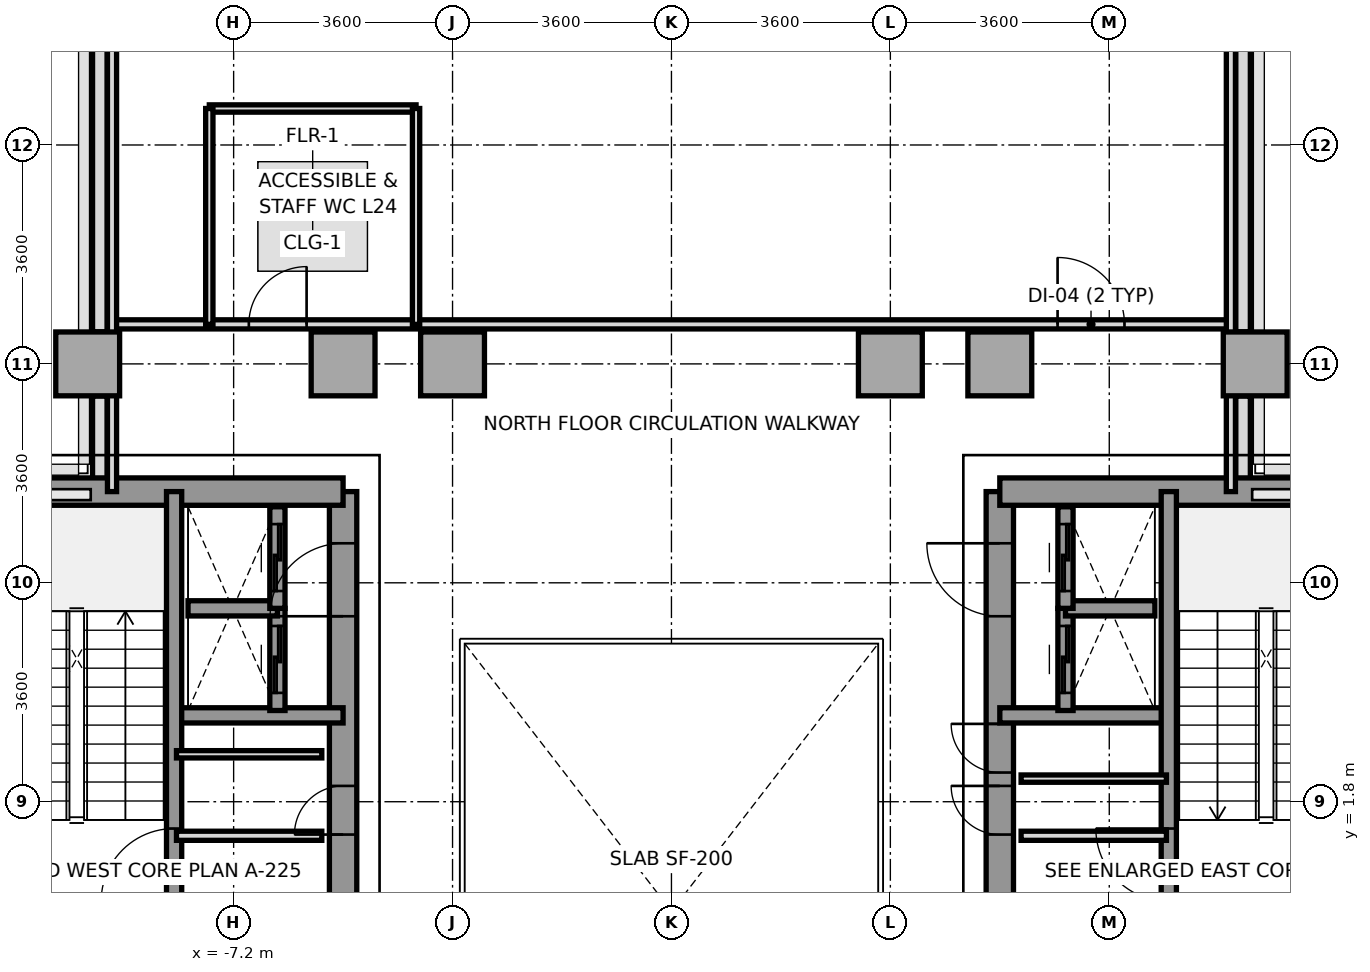
"""IFC4 building model, lengths in metres.
Left out: names, types, materials, properties, quantities, classifications, styles, units other than length and angle.
Written with IfcOpenShell. Run it as: python <this file> out.ifc"""

import sys

from ifc_helpers import new_model, si_unit, direction, frame, frame_2d, origin, origin_2d, place, context, subcontext, project, spatial, rectangle, extrude, source, transform, mapped, element, fill, save


model = new_model("IFC4")
c1 = context("Model", 3, precision=1e-05, world=origin(), true_north=direction((0.0, 1.0)))
c2 = subcontext(c1, "Body", "Model", "MODEL_VIEW")
j1 = project(units=[si_unit("LENGTHUNIT", "METRE"), si_unit("PLANEANGLEUNIT", "RADIAN")], contexts=[c1])
p1 = place(None, origin())
s1 = spatial("IfcSite", under=j1, at=p1, CompositionType="ELEMENT")
p2 = place(p1, origin())
s2 = spatial("IfcBuilding", under=s1, at=p2, CompositionType="ELEMENT")
p3 = place(p2, frame((0.0, 0.0, 93.0)))
s3 = spatial("IfcBuildingStorey", under=s2, at=p3, CompositionType="ELEMENT", Elevation=93.0)
m1 = source(origin(), c2, "Body", "SweptSolid", [
    extrude(rectangle(XDim=1.05, YDim=1.05, at=origin_2d()), origin(), (0.0, 0.0, 1.0), 4.0),
])
for number, where, z_axis, x_axis in (
    (1, (-9.6, 9.0, 0.0), (0.0, 0.0, 1.0), (1.0, 0.0, 0.0)),
    (2, (-5.4, 9.0, 0.0), (0.0, 0.0, 1.0), (1.0, 0.0, 0.0)),
    (3, (-3.6, 9.0, 0.0), (0.0, 0.0, 1.0), (1.0, 0.0, 0.0)),
    (4, (3.6, 9.0, 0.0), (0.0, 0.0, 1.0), (1.0, 0.0, 0.0)),
    (5, (5.4, 9.0, 0.0), (0.0, 0.0, 1.0), (1.0, 0.0, 0.0)),
    (6, (9.6, 9.0, 0.0), (0.0, 0.0, 1.0), (1.0, 0.0, 0.0)),
):
    element("IfcColumn", number, at=place(p3, frame(where, z_axis=z_axis, x_axis=x_axis)), inside=s3, PredefinedType="COLUMN", context=c2, shape_type="MappedRepresentation", body=[
        mapped(m1, transform((0.0, 0.0, 0.0), x_axis=(1.0, 0.0, 0.0), y_axis=(0.0, 1.0, 0.0), z_axis=(0.0, 0.0, 1.0), scale=1.0)),
    ])
p4 = place(p3, frame((-9.4, 6.953, 0.0), z_axis=(0.0, 0.0, 1.0), x_axis=(0.0, 1.0, 0.0)))
e7 = element("IfcWall", 7, at=p4, inside=s3, PredefinedType="PARAPET", context=c2, shape_type="SweptSolid", body=[
    extrude(rectangle(XDim=1.519, YDim=0.24, at=frame_2d((0.76, 0.0))), origin(), (0.0, 0.0, 1.0), 1.15),
])
p5 = place(p3, frame((-9.4, 9.528, 0.0), z_axis=(0.0, 0.0, 1.0), x_axis=(0.0, 1.0, 0.0)))
e8 = element("IfcWall", 8, at=p5, inside=s3, PredefinedType="PARAPET", context=c2, shape_type="SweptSolid", body=[
    extrude(rectangle(XDim=6.075, YDim=0.24, at=frame_2d((3.037, 0.0))), origin(), (0.0, 0.0, 1.0), 1.15),
])
p6 = place(p3, frame((9.4, 15.358, 0.0), z_axis=(0.0, 0.0, 1.0), x_axis=(0.0, -1.0, 0.0)))
e9 = element("IfcWall", 9, at=p6, inside=s3, PredefinedType="PARAPET", context=c2, shape_type="SweptSolid", body=[
    extrude(rectangle(XDim=5.83, YDim=0.24, at=frame_2d((2.915, 0.0))), origin(), (0.0, 0.0, 1.0), 1.15),
])
p7 = place(p3, frame((9.4, 8.472, 0.0), z_axis=(0.0, 0.0, 1.0), x_axis=(0.0, -1.0, 0.0)))
e10 = element("IfcWall", 10, at=p7, inside=s3, PredefinedType="PARAPET", context=c2, shape_type="SweptSolid", body=[
    extrude(rectangle(XDim=1.519, YDim=0.24, at=frame_2d((0.76, 0.0))), origin(), (0.0, 0.0, 1.0), 1.15),
])
p8 = place(p3, frame((-5.4, -5.6, 0.0), z_axis=(0.0, 0.0, 1.0), x_axis=(0.0, 1.0, 0.0)))
e11 = element("IfcWall", 11, at=p8, inside=s3, PredefinedType="SHEAR", context=c2, shape_type="SweptSolid", body=[
    extrude(rectangle(XDim=12.5, YDim=0.45, at=frame_2d((6.25, 0.0))), origin(), (0.0, 0.0, 1.0), 4.0),
])
p9 = place(p8, frame((4.55, 0.0, 0.0)))
e12 = element("IfcOpeningElement", 12, at=p9, cuts=e11, PredefinedType="OPENING", context=c2, shape_type="SweptSolid", body=[
    extrude(rectangle(XDim=1.2, YDim=2.2, at=frame_2d((0.6, 1.1))), frame((0.0, 0.235, 0.0), z_axis=(0.0, -1.0, 0.0), x_axis=(1.0, 0.0, 0.0)), (0.0, 0.0, 1.0), 0.47),
])
p10 = place(p8, frame((10.45, 0.0, 0.0)))
e13 = element("IfcOpeningElement", 13, at=p10, cuts=e11, PredefinedType="OPENING", context=c2, shape_type="SweptSolid", body=[
    extrude(rectangle(XDim=1.2, YDim=2.2, at=frame_2d((0.6, 1.1))), frame((0.0, 0.235, 0.0), z_axis=(0.0, -1.0, 0.0), x_axis=(1.0, 0.0, 0.0)), (0.0, 0.0, 1.0), 0.47),
])
p11 = place(p8, frame((6.86, 0.0, 0.0)))
e14 = element("IfcOpeningElement", 14, at=p11, cuts=e11, PredefinedType="OPENING", context=c2, shape_type="SweptSolid", body=[
    extrude(rectangle(XDim=0.8, YDim=2.1, at=frame_2d((0.4, 1.05))), frame((0.0, 0.235, 0.0), z_axis=(0.0, -1.0, 0.0), x_axis=(1.0, 0.0, 0.0)), (0.0, 0.0, 1.0), 0.47),
])
p12 = place(p3, frame((-11.381, 6.9, 0.0), z_axis=(0.0, 0.0, 1.0), x_axis=(1.0, 0.0, 0.0)))
e15 = element("IfcWall", 15, at=p12, inside=s3, PredefinedType="SHEAR", context=c2, shape_type="SweptSolid", body=[
    extrude(rectangle(XDim=5.981, YDim=0.45, at=frame_2d((2.991, 0.0))), origin(), (0.0, 0.0, 1.0), 4.0),
])
p13 = place(p3, frame((-8.18, 3.22, 0.0), z_axis=(0.0, 0.0, 1.0), x_axis=(1.0, 0.0, 0.0)))
e16 = element("IfcWall", 16, at=p13, inside=s3, PredefinedType="SOLIDWALL", context=c2, shape_type="SweptSolid", body=[
    extrude(rectangle(XDim=2.78, YDim=0.25, at=frame_2d((1.39, 0.0))), origin(), (0.0, 0.0, 1.0), 4.0),
])
p14 = place(p3, frame((-8.179, -0.041, 0.0), z_axis=(0.0, 0.0, 1.0), x_axis=(0.0, 1.0, 0.0)))
e17 = element("IfcWall", 17, at=p14, inside=s3, PredefinedType="SOLIDWALL", context=c2, shape_type="SweptSolid", body=[
    extrude(rectangle(XDim=6.941, YDim=0.25, at=frame_2d((3.47, 0.0))), origin(), (0.0, 0.0, 1.0), 4.0),
])
p15 = place(p14, frame((0.2, 0.0, 0.0)))
e18 = element("IfcOpeningElement", 18, at=p15, cuts=e17, PredefinedType="OPENING", context=c2, shape_type="SweptSolid", body=[
    extrude(rectangle(XDim=1.2, YDim=2.2, at=frame_2d((0.6, 1.1))), frame((0.0, 0.135, 0.0), z_axis=(0.0, -1.0, 0.0), x_axis=(1.0, 0.0, 0.0)), (0.0, 0.0, 1.0), 0.27),
])
p16 = place(p3, frame((5.4, -5.6, 0.0), z_axis=(0.0, 0.0, 1.0), x_axis=(0.0, 1.0, 0.0)))
e19 = element("IfcWall", 19, at=p16, inside=s3, PredefinedType="SHEAR", context=c2, shape_type="SweptSolid", body=[
    extrude(rectangle(XDim=12.5, YDim=0.45, at=frame_2d((6.25, 0.0))), origin(), (0.0, 0.0, 1.0), 4.0),
])
p17 = place(p16, frame((4.55, 0.0, 0.0)))
e20 = element("IfcOpeningElement", 20, at=p17, cuts=e19, PredefinedType="OPENING", context=c2, shape_type="SweptSolid", body=[
    extrude(rectangle(XDim=1.2, YDim=2.2, at=frame_2d((0.6, 1.1))), frame((0.0, 0.235, 0.0), z_axis=(0.0, -1.0, 0.0), x_axis=(1.0, 0.0, 0.0)), (0.0, 0.0, 1.0), 0.47),
])
p18 = place(p16, frame((10.45, 0.0, 0.0)))
e21 = element("IfcOpeningElement", 21, at=p18, cuts=e19, PredefinedType="OPENING", context=c2, shape_type="SweptSolid", body=[
    extrude(rectangle(XDim=1.2, YDim=2.2, at=frame_2d((0.6, 1.1))), frame((0.0, 0.235, 0.0), z_axis=(0.0, -1.0, 0.0), x_axis=(1.0, 0.0, 0.0)), (0.0, 0.0, 1.0), 0.47),
])
p19 = place(p16, frame((6.86, 0.0, 0.0)))
e22 = element("IfcOpeningElement", 22, at=p19, cuts=e19, PredefinedType="OPENING", context=c2, shape_type="SweptSolid", body=[
    extrude(rectangle(XDim=0.8, YDim=2.1, at=frame_2d((0.4, 1.05))), frame((0.0, 0.235, 0.0), z_axis=(0.0, -1.0, 0.0), x_axis=(1.0, 0.0, 0.0)), (0.0, 0.0, 1.0), 0.47),
])
p20 = place(p16, frame((7.88, 0.0, 0.0)))
e23 = element("IfcOpeningElement", 23, at=p20, cuts=e19, PredefinedType="OPENING", context=c2, shape_type="SweptSolid", body=[
    extrude(rectangle(XDim=0.8, YDim=2.1, at=frame_2d((0.4, 1.05))), frame((0.0, 0.235, 0.0), z_axis=(0.0, -1.0, 0.0), x_axis=(1.0, 0.0, 0.0)), (0.0, 0.0, 1.0), 0.47),
])
p21 = place(p3, frame((5.4, 6.9, 0.0), z_axis=(0.0, 0.0, 1.0), x_axis=(1.0, 0.0, 0.0)))
e24 = element("IfcWall", 24, at=p21, inside=s3, PredefinedType="SHEAR", context=c2, shape_type="SweptSolid", body=[
    extrude(rectangle(XDim=5.981, YDim=0.45, at=frame_2d((2.991, 0.0))), origin(), (0.0, 0.0, 1.0), 4.0),
])
p22 = place(p3, frame((5.4, 3.22, 0.0), z_axis=(0.0, 0.0, 1.0), x_axis=(1.0, 0.0, 0.0)))
e25 = element("IfcWall", 25, at=p22, inside=s3, PredefinedType="SOLIDWALL", context=c2, shape_type="SweptSolid", body=[
    extrude(rectangle(XDim=2.78, YDim=0.25, at=frame_2d((1.39, 0.0))), origin(), (0.0, 0.0, 1.0), 4.0),
])
p23 = place(p3, frame((8.179, -0.041, 0.0), z_axis=(0.0, 0.0, 1.0), x_axis=(0.0, 1.0, 0.0)))
e26 = element("IfcWall", 26, at=p23, inside=s3, PredefinedType="SOLIDWALL", context=c2, shape_type="SweptSolid", body=[
    extrude(rectangle(XDim=6.941, YDim=0.25, at=frame_2d((3.47, 0.0))), origin(), (0.0, 0.0, 1.0), 4.0),
])
p24 = place(p23, frame((0.2, 0.0, 0.0)))
e27 = element("IfcOpeningElement", 27, at=p24, cuts=e26, PredefinedType="OPENING", context=c2, shape_type="SweptSolid", body=[
    extrude(rectangle(XDim=1.2, YDim=2.2, at=frame_2d((0.6, 1.1))), frame((0.0, 0.135, 0.0), z_axis=(0.0, -1.0, 0.0), x_axis=(1.0, 0.0, 0.0)), (0.0, 0.0, 1.0), 0.27),
])
p25 = place(p3, frame((-6.48, 3.3, 0.0), z_axis=(0.0, 0.0, 1.0), x_axis=(0.0, 1.0, 0.0)))
e28 = element("IfcWall", 28, at=p25, inside=s3, PredefinedType="SOLIDWALL", context=c2, shape_type="SweptSolid", body=[
    extrude(rectangle(XDim=1.68, YDim=0.25, at=frame_2d((0.84, 0.0))), origin(), (0.0, 0.0, 1.0), 4.0),
])
p26 = place(p25, frame((0.29, 0.0, 0.0)))
e29 = element("IfcOpeningElement", 29, at=p26, cuts=e28, PredefinedType="OPENING", context=c2, shape_type="SweptSolid", body=[
    extrude(rectangle(XDim=1.1, YDim=2.2, at=frame_2d((0.55, 1.1))), frame((0.0, 0.135, 0.0), z_axis=(0.0, -1.0, 0.0), x_axis=(1.0, 0.0, 0.0)), (0.0, 0.0, 1.0), 0.27),
])
p27 = place(p3, frame((-7.95, 4.98, 0.0), z_axis=(0.0, 0.0, 1.0), x_axis=(1.0, 0.0, 0.0)))
e30 = element("IfcWall", 30, at=p27, inside=s3, PredefinedType="SOLIDWALL", context=c2, shape_type="SweptSolid", body=[
    extrude(rectangle(XDim=1.47, YDim=0.25, at=frame_2d((0.735, 0.0))), origin(), (0.0, 0.0, 1.0), 4.0),
])
p28 = place(p3, frame((-6.48, 4.98, 0.0), z_axis=(0.0, 0.0, 1.0), x_axis=(0.0, 1.0, 0.0)))
e31 = element("IfcWall", 31, at=p28, inside=s3, PredefinedType="SOLIDWALL", context=c2, shape_type="SweptSolid", body=[
    extrude(rectangle(XDim=1.67, YDim=0.25, at=frame_2d((0.835, 0.0))), origin(), (0.0, 0.0, 1.0), 4.0),
])
p29 = place(p28, frame((0.285, 0.0, 0.0)))
e32 = element("IfcOpeningElement", 32, at=p29, cuts=e31, PredefinedType="OPENING", context=c2, shape_type="SweptSolid", body=[
    extrude(rectangle(XDim=1.1, YDim=2.2, at=frame_2d((0.55, 1.1))), frame((0.0, 0.135, 0.0), z_axis=(0.0, -1.0, 0.0), x_axis=(1.0, 0.0, 0.0)), (0.0, 0.0, 1.0), 0.27),
])
p30 = place(p3, frame((6.48, 3.3, 0.0), z_axis=(0.0, 0.0, 1.0), x_axis=(0.0, 1.0, 0.0)))
e33 = element("IfcWall", 33, at=p30, inside=s3, PredefinedType="SOLIDWALL", context=c2, shape_type="SweptSolid", body=[
    extrude(rectangle(XDim=1.68, YDim=0.25, at=frame_2d((0.84, 0.0))), origin(), (0.0, 0.0, 1.0), 4.0),
])
p31 = place(p30, frame((0.29, 0.0, 0.0)))
e34 = element("IfcOpeningElement", 34, at=p31, cuts=e33, PredefinedType="OPENING", context=c2, shape_type="SweptSolid", body=[
    extrude(rectangle(XDim=1.1, YDim=2.2, at=frame_2d((0.55, 1.1))), frame((0.0, 0.135, 0.0), z_axis=(0.0, -1.0, 0.0), x_axis=(1.0, 0.0, 0.0)), (0.0, 0.0, 1.0), 0.27),
])
p32 = place(p3, frame((6.48, 4.98, 0.0), z_axis=(0.0, 0.0, 1.0), x_axis=(1.0, 0.0, 0.0)))
e35 = element("IfcWall", 35, at=p32, inside=s3, PredefinedType="SOLIDWALL", context=c2, shape_type="SweptSolid", body=[
    extrude(rectangle(XDim=1.47, YDim=0.25, at=frame_2d((0.735, 0.0))), origin(), (0.0, 0.0, 1.0), 4.0),
])
p33 = place(p3, frame((6.48, 4.98, 0.0), z_axis=(0.0, 0.0, 1.0), x_axis=(0.0, 1.0, 0.0)))
e36 = element("IfcWall", 36, at=p33, inside=s3, PredefinedType="SOLIDWALL", context=c2, shape_type="SweptSolid", body=[
    extrude(rectangle(XDim=1.67, YDim=0.25, at=frame_2d((0.835, 0.0))), origin(), (0.0, 0.0, 1.0), 4.0),
])
p34 = place(p33, frame((0.285, 0.0, 0.0)))
e37 = element("IfcOpeningElement", 37, at=p34, cuts=e36, PredefinedType="OPENING", context=c2, shape_type="SweptSolid", body=[
    extrude(rectangle(XDim=1.1, YDim=2.2, at=frame_2d((0.55, 1.1))), frame((0.0, 0.135, 0.0), z_axis=(0.0, -1.0, 0.0), x_axis=(1.0, 0.0, 0.0)), (0.0, 0.0, 1.0), 0.27),
])
for number, where, z_axis, x_axis in (
    (38, (-8.14, 1.24, 0.0), (0.0, 0.0, 1.0), (1.0, 0.0, 0.0)),
    (39, (5.75, 1.24, 0.0), (0.0, 0.0, 1.0), (1.0, 0.0, 0.0)),
):
    element("IfcWall", number, at=place(p3, frame(where, z_axis=z_axis, x_axis=x_axis)), inside=s3, PredefinedType="PARTITIONING", context=c2, shape_type="SweptSolid", body=[
        extrude(rectangle(XDim=2.39, YDim=0.15, at=frame_2d((1.195, 0.0))), origin(), (0.0, 0.0, 1.0), 3.1),
    ])
for number, where, z_axis, x_axis in (
    (40, (-8.14, 2.58, 0.0), (0.0, 0.0, 1.0), (1.0, 0.0, 0.0)),
    (41, (5.75, 2.18, 0.0), (0.0, 0.0, 1.0), (1.0, 0.0, 0.0)),
):
    element("IfcWall", number, at=place(p3, frame(where, z_axis=z_axis, x_axis=x_axis)), inside=s3, PredefinedType="PARTITIONING", context=c2, shape_type="SweptSolid", body=[
        extrude(rectangle(XDim=2.39, YDim=0.12, at=frame_2d((1.195, 0.0))), origin(), (0.0, 0.0, 1.0), 3.1),
    ])
p35 = place(p3, frame((-9.2, 9.65, 0.0), z_axis=(0.0, 0.0, 1.0), x_axis=(1.0, 0.0, 0.0)))
e42 = element("IfcWall", 42, at=p35, inside=s3, PredefinedType="PARTITIONING", context=c2, shape_type="SweptSolid", body=[
    extrude(rectangle(XDim=18.4, YDim=0.15, at=frame_2d((9.2, 0.0))), origin(), (0.0, 0.0, 1.0), 4.0),
])
p36 = place(p35, frame((2.25, 0.0, 0.0)))
e43 = element("IfcOpeningElement", 43, at=p36, cuts=e42, PredefinedType="OPENING", context=c2, shape_type="SweptSolid", body=[
    extrude(rectangle(XDim=0.95, YDim=2.15, at=frame_2d((0.475, 1.075))), frame((0.0, 0.085, 0.0), z_axis=(0.0, -1.0, 0.0), x_axis=(1.0, 0.0, 0.0)), (0.0, 0.0, 1.0), 0.17),
])
p37 = place(p35, frame((15.55, 0.0, 0.0)))
e44 = element("IfcOpeningElement", 44, at=p37, cuts=e42, PredefinedType="OPENING", context=c2, shape_type="SweptSolid", body=[
    extrude(rectangle(XDim=1.1, YDim=2.2, at=frame_2d((0.55, 1.1))), frame((0.0, 0.085, 0.0), z_axis=(0.0, -1.0, 0.0), x_axis=(1.0, 0.0, 0.0)), (0.0, 0.0, 1.0), 0.17),
])
for number, where, z_axis, x_axis in (
    (45, (-9.2, 6.9, 0.0), (0.0, 0.0, 1.0), (0.0, 1.0, 0.0)),
    (46, (9.2, 6.9, 0.0), (0.0, 0.0, 1.0), (0.0, 1.0, 0.0)),
):
    element("IfcWall", number, at=place(p3, frame(where, z_axis=z_axis, x_axis=x_axis)), inside=s3, PredefinedType="PARTITIONING", context=c2, shape_type="SweptSolid", body=[
        extrude(rectangle(XDim=8.78, YDim=0.15, at=frame_2d((4.39, 0.0))), origin(), (0.0, 0.0, 1.0), 3.5),
    ])
p38 = place(p3, frame((-7.6, 13.2, 0.0), z_axis=(0.0, 0.0, 1.0), x_axis=(1.0, 0.0, 0.0)))
e47 = element("IfcWall", 47, at=p38, inside=s3, PredefinedType="PARTITIONING", context=c2, shape_type="SweptSolid", body=[
    extrude(rectangle(XDim=3.4, YDim=0.12, at=frame_2d((1.7, 0.0))), origin(), (0.0, 0.0, 1.0), 4.0),
])
for number, where, z_axis, x_axis in (
    (48, (-7.6, 9.65, 0.0), (0.0, 0.0, 1.0), (0.0, 1.0, 0.0)),
    (49, (-4.2, 9.65, 0.0), (0.0, 0.0, 1.0), (0.0, 1.0, 0.0)),
):
    element("IfcWall", number, at=place(p3, frame(where, z_axis=z_axis, x_axis=x_axis)), inside=s3, PredefinedType="PARTITIONING", context=c2, shape_type="SweptSolid", body=[
        extrude(rectangle(XDim=3.55, YDim=0.12, at=frame_2d((1.775, 0.0))), origin(), (0.0, 0.0, 1.0), 4.0),
    ])
m2 = source(origin(), c2, "Body", "SweptSolid", [
    extrude(rectangle(XDim=1.2, YDim=2.2, at=frame_2d((0.6, 1.1))), frame((0.0, 0.025, 0.0), z_axis=(0.0, -1.0, 0.0), x_axis=(1.0, 0.0, 0.0)), (0.0, 0.0, 1.0), 0.05),
])
p39 = place(p15, origin())
e50 = element("IfcDoor", 50, at=p39, inside=s3, OperationType="SINGLE_SWING_LEFT", PredefinedType="DOOR", context=c2, shape_type="MappedRepresentation", body=[
    mapped(m2, transform((0.0, 0.0, 0.0), x_axis=(1.0, 0.0, 0.0), y_axis=(0.0, 1.0, 0.0), z_axis=(0.0, 0.0, 1.0), scale=1.0)),
])
fill(e18, e50)
p40 = place(p10, origin())
e51 = element("IfcDoor", 51, at=p40, inside=s3, OperationType="SINGLE_SWING_LEFT", PredefinedType="DOOR", context=c2, shape_type="MappedRepresentation", body=[
    mapped(m2, transform((0.0, 0.0, 0.0), x_axis=(1.0, 0.0, 0.0), y_axis=(0.0, 1.0, 0.0), z_axis=(0.0, 0.0, 1.0), scale=1.0)),
])
fill(e13, e51)
p41 = place(p24, origin())
e52 = element("IfcDoor", 52, at=p41, inside=s3, OperationType="SINGLE_SWING_RIGHT", PredefinedType="DOOR", context=c2, shape_type="MappedRepresentation", body=[
    mapped(m2, transform((0.0, 0.0, 0.0), x_axis=(1.0, 0.0, 0.0), y_axis=(0.0, 1.0, 0.0), z_axis=(0.0, 0.0, 1.0), scale=1.0)),
])
fill(e27, e52)
p42 = place(p18, origin())
e53 = element("IfcDoor", 53, at=p42, inside=s3, OperationType="SINGLE_SWING_RIGHT", PredefinedType="DOOR", context=c2, shape_type="MappedRepresentation", body=[
    mapped(m2, transform((0.0, 0.0, 0.0), x_axis=(1.0, 0.0, 0.0), y_axis=(0.0, 1.0, 0.0), z_axis=(0.0, 0.0, 1.0), scale=1.0)),
])
fill(e21, e53)
m3 = source(origin(), c2, "Body", "SweptSolid", [
    extrude(rectangle(XDim=0.8, YDim=2.1, at=frame_2d((0.4, 1.05))), frame((0.0, 0.025, 0.0), z_axis=(0.0, -1.0, 0.0), x_axis=(1.0, 0.0, 0.0)), (0.0, 0.0, 1.0), 0.05),
])
p43 = place(p11, origin())
e54 = element("IfcDoor", 54, at=p43, inside=s3, OperationType="SINGLE_SWING_LEFT", PredefinedType="DOOR", context=c2, shape_type="MappedRepresentation", body=[
    mapped(m3, transform((0.0, 0.0, 0.0), x_axis=(1.0, 0.0, 0.0), y_axis=(0.0, 1.0, 0.0), z_axis=(0.0, 0.0, 1.0), scale=1.0)),
])
fill(e14, e54)
p44 = place(p19, origin())
e55 = element("IfcDoor", 55, at=p44, inside=s3, OperationType="SINGLE_SWING_RIGHT", PredefinedType="DOOR", context=c2, shape_type="MappedRepresentation", body=[
    mapped(m3, transform((0.0, 0.0, 0.0), x_axis=(1.0, 0.0, 0.0), y_axis=(0.0, 1.0, 0.0), z_axis=(0.0, 0.0, 1.0), scale=1.0)),
])
fill(e22, e55)
p45 = place(p20, origin())
e56 = element("IfcDoor", 56, at=p45, inside=s3, OperationType="SINGLE_SWING_RIGHT", PredefinedType="DOOR", context=c2, shape_type="MappedRepresentation", body=[
    mapped(m3, transform((0.0, 0.0, 0.0), x_axis=(1.0, 0.0, 0.0), y_axis=(0.0, 1.0, 0.0), z_axis=(0.0, 0.0, 1.0), scale=1.0)),
])
fill(e23, e56)
m4 = source(origin(), c2, "Body", "SweptSolid", [
    extrude(rectangle(XDim=1.1, YDim=2.2, at=frame_2d((0.55, 1.1))), frame((0.0, 0.025, 0.0), z_axis=(0.0, -1.0, 0.0), x_axis=(1.0, 0.0, 0.0)), (0.0, 0.0, 1.0), 0.05),
])
p46 = place(p26, origin())
e57 = element("IfcDoor", 57, at=p46, inside=s3, OperationType="SLIDING_TO_LEFT", PredefinedType="DOOR", context=c2, shape_type="MappedRepresentation", body=[
    mapped(m4, transform((0.0, 0.0, 0.0), x_axis=(1.0, 0.0, 0.0), y_axis=(0.0, 1.0, 0.0), z_axis=(0.0, 0.0, 1.0), scale=1.0)),
])
fill(e29, e57)
p47 = place(p29, origin())
e58 = element("IfcDoor", 58, at=p47, inside=s3, OperationType="SLIDING_TO_LEFT", PredefinedType="DOOR", context=c2, shape_type="MappedRepresentation", body=[
    mapped(m4, transform((0.0, 0.0, 0.0), x_axis=(1.0, 0.0, 0.0), y_axis=(0.0, 1.0, 0.0), z_axis=(0.0, 0.0, 1.0), scale=1.0)),
])
fill(e32, e58)
p48 = place(p31, origin())
e59 = element("IfcDoor", 59, at=p48, inside=s3, OperationType="SLIDING_TO_LEFT", PredefinedType="DOOR", context=c2, shape_type="MappedRepresentation", body=[
    mapped(m4, transform((0.0, 0.0, 0.0), x_axis=(1.0, 0.0, 0.0), y_axis=(0.0, 1.0, 0.0), z_axis=(0.0, 0.0, 1.0), scale=1.0)),
])
fill(e34, e59)
p49 = place(p34, origin())
e60 = element("IfcDoor", 60, at=p49, inside=s3, OperationType="SLIDING_TO_LEFT", PredefinedType="DOOR", context=c2, shape_type="MappedRepresentation", body=[
    mapped(m4, transform((0.0, 0.0, 0.0), x_axis=(1.0, 0.0, 0.0), y_axis=(0.0, 1.0, 0.0), z_axis=(0.0, 0.0, 1.0), scale=1.0)),
])
fill(e37, e60)
m5 = source(origin(), c2, "Body", "SweptSolid", [
    extrude(rectangle(XDim=0.95, YDim=2.15, at=frame_2d((0.475, 1.075))), frame((0.0, 0.025, 0.0), z_axis=(0.0, -1.0, 0.0), x_axis=(1.0, 0.0, 0.0)), (0.0, 0.0, 1.0), 0.05),
])
p50 = place(p36, origin())
e61 = element("IfcDoor", 61, at=p50, inside=s3, OperationType="SINGLE_SWING_RIGHT", PredefinedType="DOOR", context=c2, shape_type="MappedRepresentation", body=[
    mapped(m5, transform((0.0, 0.0, 0.0), x_axis=(1.0, 0.0, 0.0), y_axis=(0.0, 1.0, 0.0), z_axis=(0.0, 0.0, 1.0), scale=1.0)),
])
fill(e43, e61)
p51 = place(p37, origin())
e62 = element("IfcDoor", 62, at=p51, inside=s3, OperationType="SINGLE_SWING_LEFT", PredefinedType="DOOR", context=c2, shape_type="MappedRepresentation", body=[
    mapped(m4, transform((0.0, 0.0, 0.0), x_axis=(1.0, 0.0, 0.0), y_axis=(0.0, 1.0, 0.0), z_axis=(0.0, 0.0, 1.0), scale=1.0)),
])
fill(e44, e62)
save(model, sys.argv[1])
